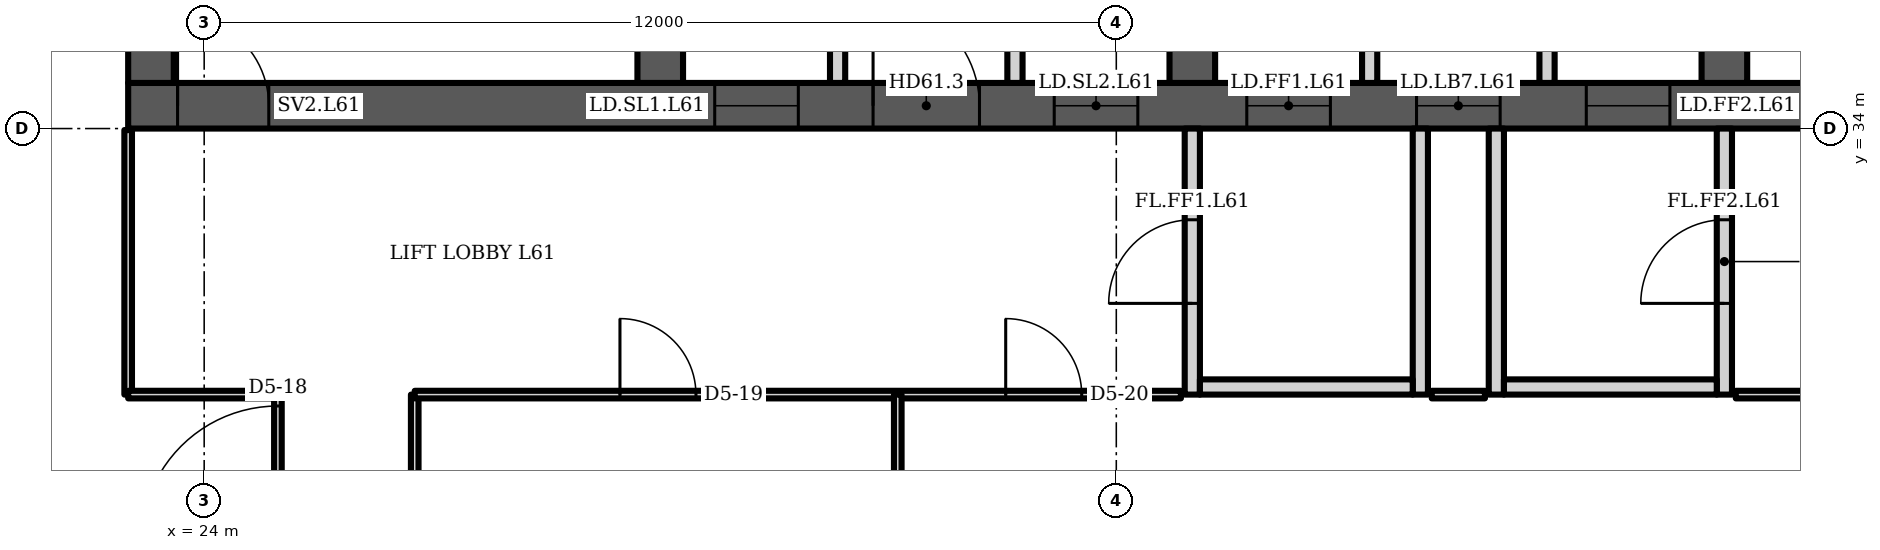
"""IFC4 building model, lengths in metres.
Left out: names, types, materials, properties, quantities, classifications, styles, units other than length and angle.
Written with IfcOpenShell. Run it as: python <this file> out.ifc"""

import sys

from ifc_helpers import new_model, si_unit, direction, frame, frame_2d, origin, place, context, subcontext, project, spatial, polyline, rectangle, outline, extrude, element, fill, save


model = new_model("IFC4")
c1 = context("Model", 3, precision=1e-05, world=origin(), true_north=direction((0.0, 1.0)))
c2 = subcontext(c1, "Body", "Model", "MODEL_VIEW")
j1 = project(units=[si_unit("LENGTHUNIT", "METRE"), si_unit("PLANEANGLEUNIT", "RADIAN")], contexts=[c1])
p1 = place(None, origin())
s1 = spatial("IfcSite", under=j1, at=p1, CompositionType="ELEMENT")
p2 = place(p1, origin())
s2 = spatial("IfcBuilding", under=s1, at=p2, CompositionType="ELEMENT")
p3 = place(p2, frame((0.0, 0.0, 243.1)))
s3 = spatial("IfcBuildingStorey", under=s2, at=p3, CompositionType="ELEMENT", Elevation=243.1)
p4 = place(p3, frame((23.0, 34.3, 0.0), z_axis=(0.0, 0.0, 1.0), x_axis=(1.0, 0.0, 0.0)))
e1 = element("IfcWall", 1, at=p4, inside=s3, PredefinedType="SHEAR", context=c2, shape_type="SweptSolid", body=[
    extrude(rectangle(XDim=35.0, YDim=0.6, at=frame_2d((17.5, 0.0))), origin(), (0.0, 0.0, 1.0), 3.6),
])
p5 = place(p4, frame((0.65, 0.0, 0.0)))
e2 = element("IfcOpeningElement", 2, at=p5, cuts=e1, PredefinedType="OPENING", context=c2, shape_type="SweptSolid", body=[
    extrude(rectangle(XDim=1.2, YDim=2.1, at=frame_2d((0.6, 1.05))), frame((0.0, 0.31, 0.0), z_axis=(0.0, -1.0, 0.0), x_axis=(1.0, 0.0, 0.0)), (0.0, 0.0, 1.0), 0.62),
])
p6 = place(p4, frame((7.717, 0.0, 0.0)))
e3 = element("IfcOpeningElement", 3, at=p6, cuts=e1, PredefinedType="OPENING", context=c2, shape_type="SweptSolid", body=[
    extrude(rectangle(XDim=1.1, YDim=2.1, at=frame_2d((0.55, 1.05))), frame((0.0, 0.31, 0.0), z_axis=(0.0, -1.0, 0.0), x_axis=(1.0, 0.0, 0.0)), (0.0, 0.0, 1.0), 0.62),
])
p7 = place(p4, frame((12.183, 0.0, 0.0)))
e4 = element("IfcOpeningElement", 4, at=p7, cuts=e1, PredefinedType="OPENING", context=c2, shape_type="SweptSolid", body=[
    extrude(rectangle(XDim=1.1, YDim=2.1, at=frame_2d((0.55, 1.05))), frame((0.0, 0.31, 0.0), z_axis=(0.0, -1.0, 0.0), x_axis=(1.0, 0.0, 0.0)), (0.0, 0.0, 1.0), 0.62),
])
p8 = place(p4, frame((9.8, 0.0, 0.0)))
e5 = element("IfcOpeningElement", 5, at=p8, cuts=e1, PredefinedType="OPENING", context=c2, shape_type="SweptSolid", body=[
    extrude(rectangle(XDim=1.4, YDim=2.1, at=frame_2d((0.7, 1.05))), frame((0.0, 0.31, 0.0), z_axis=(0.0, -1.0, 0.0), x_axis=(1.0, 0.0, 0.0)), (0.0, 0.0, 1.0), 0.62),
])
p9 = place(p4, frame((14.717, 0.0, 0.0)))
e6 = element("IfcOpeningElement", 6, at=p9, cuts=e1, PredefinedType="OPENING", context=c2, shape_type="SweptSolid", body=[
    extrude(rectangle(XDim=1.1, YDim=2.1, at=frame_2d((0.55, 1.05))), frame((0.0, 0.31, 0.0), z_axis=(0.0, -1.0, 0.0), x_axis=(1.0, 0.0, 0.0)), (0.0, 0.0, 1.0), 0.62),
])
p10 = place(p4, frame((16.95, 0.0, 0.0)))
e7 = element("IfcOpeningElement", 7, at=p10, cuts=e1, PredefinedType="OPENING", context=c2, shape_type="SweptSolid", body=[
    extrude(rectangle(XDim=1.1, YDim=2.1, at=frame_2d((0.55, 1.05))), frame((0.0, 0.31, 0.0), z_axis=(0.0, -1.0, 0.0), x_axis=(1.0, 0.0, 0.0)), (0.0, 0.0, 1.0), 0.62),
])
p11 = place(p4, frame((19.183, 0.0, 0.0)))
e8 = element("IfcOpeningElement", 8, at=p11, cuts=e1, PredefinedType="OPENING", context=c2, shape_type="SweptSolid", body=[
    extrude(rectangle(XDim=1.1, YDim=2.1, at=frame_2d((0.55, 1.05))), frame((0.0, 0.31, 0.0), z_axis=(0.0, -1.0, 0.0), x_axis=(1.0, 0.0, 0.0)), (0.0, 0.0, 1.0), 0.62),
])
p12 = place(p4, frame((26.15, 0.0, 0.0)))
e9 = element("IfcOpeningElement", 9, at=p12, cuts=e1, PredefinedType="OPENING", context=c2, shape_type="SweptSolid", body=[
    extrude(rectangle(XDim=1.2, YDim=2.1, at=frame_2d((0.6, 1.05))), frame((0.0, 0.31, 0.0), z_axis=(0.0, -1.0, 0.0), x_axis=(1.0, 0.0, 0.0)), (0.0, 0.0, 1.0), 0.62),
])
p13 = place(p4, frame((28.767, 0.0, 0.0)))
e10 = element("IfcOpeningElement", 10, at=p13, cuts=e1, PredefinedType="OPENING", context=c2, shape_type="SweptSolid", body=[
    extrude(rectangle(XDim=1.0, YDim=2.1, at=frame_2d((0.5, 1.05))), frame((0.0, 0.31, 0.0), z_axis=(0.0, -1.0, 0.0), x_axis=(1.0, 0.0, 0.0)), (0.0, 0.0, 1.0), 0.62),
])
p14 = place(p4, frame((33.083, 0.0, 0.0)))
e11 = element("IfcOpeningElement", 11, at=p14, cuts=e1, PredefinedType="OPENING", context=c2, shape_type="SweptSolid", body=[
    extrude(rectangle(XDim=1.0, YDim=2.1, at=frame_2d((0.5, 1.05))), frame((0.0, 0.31, 0.0), z_axis=(0.0, -1.0, 0.0), x_axis=(1.0, 0.0, 0.0)), (0.0, 0.0, 1.0), 0.62),
])
p15 = place(p4, frame((30.8, 0.0, 0.0)))
e12 = element("IfcOpeningElement", 12, at=p15, cuts=e1, PredefinedType="OPENING", context=c2, shape_type="SweptSolid", body=[
    extrude(rectangle(XDim=1.4, YDim=2.1, at=frame_2d((0.7, 1.05))), frame((0.0, 0.31, 0.0), z_axis=(0.0, -1.0, 0.0), x_axis=(1.0, 0.0, 0.0)), (0.0, 0.0, 1.0), 0.62),
])
p16 = place(p3, frame((23.3, 34.6, 0.0), z_axis=(0.0, 0.0, 1.0), x_axis=(0.0, 1.0, 0.0)))
e13 = element("IfcWall", 13, at=p16, inside=s3, PredefinedType="SHEAR", context=c2, shape_type="SweptSolid", body=[
    extrude(rectangle(XDim=13.585, YDim=0.6, at=frame_2d((6.792, 0.0))), origin(), (0.0, 0.0, 1.0), 3.6),
])
p17 = place(p3, frame((30.0, 34.6, 0.0), z_axis=(0.0, 0.0, 1.0), x_axis=(0.0, 1.0, 0.0)))
e14 = element("IfcWall", 14, at=p17, inside=s3, PredefinedType="SHEAR", context=c2, shape_type="SweptSolid", body=[
    extrude(rectangle(XDim=14.171, YDim=0.6, at=frame_2d((7.085, 0.0))), origin(), (0.0, 0.0, 1.0), 3.6),
])
p18 = place(p17, frame((3.8, 0.0, 0.0)))
e15 = element("IfcOpeningElement", 15, at=p18, cuts=e14, PredefinedType="OPENING", context=c2, shape_type="SweptSolid", body=[
    extrude(rectangle(XDim=1.1, YDim=2.1, at=frame_2d((0.55, 1.05))), frame((0.0, 0.31, 0.0), z_axis=(0.0, -1.0, 0.0), x_axis=(1.0, 0.0, 0.0)), (0.0, 0.0, 1.0), 0.62),
])
p19 = place(p3, frame((37.0, 34.6, 0.0), z_axis=(0.0, 0.0, 1.0), x_axis=(0.0, 1.0, 0.0)))
e16 = element("IfcWall", 16, at=p19, inside=s3, PredefinedType="SHEAR", context=c2, shape_type="SweptSolid", body=[
    extrude(rectangle(XDim=14.784, YDim=0.6, at=frame_2d((7.392, 0.0))), origin(), (0.0, 0.0, 1.0), 3.6),
])
p20 = place(p19, frame((11.302, 0.0, 0.0)))
e17 = element("IfcOpeningElement", 17, at=p20, cuts=e16, PredefinedType="OPENING", context=c2, shape_type="SweptSolid", body=[
    extrude(rectangle(XDim=1.0, YDim=2.1, at=frame_2d((0.5, 1.05))), frame((0.0, 0.31, 0.0), z_axis=(0.0, -1.0, 0.0), x_axis=(1.0, 0.0, 0.0)), (0.0, 0.0, 1.0), 0.62),
])
p21 = place(p19, frame((3.8, 0.0, 0.0)))
e18 = element("IfcOpeningElement", 18, at=p21, cuts=e16, PredefinedType="OPENING", context=c2, shape_type="SweptSolid", body=[
    extrude(rectangle(XDim=1.1, YDim=2.1, at=frame_2d((0.55, 1.05))), frame((0.0, 0.31, 0.0), z_axis=(0.0, -1.0, 0.0), x_axis=(1.0, 0.0, 0.0)), (0.0, 0.0, 1.0), 0.62),
])
p22 = place(p3, frame((44.0, 34.6, 0.0), z_axis=(0.0, 0.0, 1.0), x_axis=(0.0, 1.0, 0.0)))
e19 = element("IfcWall", 19, at=p22, inside=s3, PredefinedType="SHEAR", context=c2, shape_type="SweptSolid", body=[
    extrude(rectangle(XDim=14.784, YDim=0.6, at=frame_2d((7.392, 0.0))), origin(), (0.0, 0.0, 1.0), 3.6),
])
p23 = place(p22, frame((11.608, 0.0, 0.0)))
e20 = element("IfcOpeningElement", 20, at=p23, cuts=e19, PredefinedType="OPENING", context=c2, shape_type="SweptSolid", body=[
    extrude(rectangle(XDim=1.0, YDim=2.1, at=frame_2d((0.5, 1.05))), frame((0.0, 0.31, 0.0), z_axis=(0.0, -1.0, 0.0), x_axis=(1.0, 0.0, 0.0)), (0.0, 0.0, 1.0), 0.62),
])
p24 = place(p22, frame((3.8, 0.0, 0.0)))
e21 = element("IfcOpeningElement", 21, at=p24, cuts=e19, PredefinedType="OPENING", context=c2, shape_type="SweptSolid", body=[
    extrude(rectangle(XDim=1.1, YDim=2.1, at=frame_2d((0.55, 1.05))), frame((0.0, 0.31, 0.0), z_axis=(0.0, -1.0, 0.0), x_axis=(1.0, 0.0, 0.0)), (0.0, 0.0, 1.0), 0.62),
])
p25 = place(p3, frame((0.0, 0.0, -0.0)))
e22 = element("IfcWall", 22, at=p25, inside=s3, PredefinedType="PARTITIONING", context=c2, shape_type="SweptSolid", body=[
    extrude(outline(polyline([(32.233, 37.45), (30.3, 37.45), (30.3, 37.65), (32.233, 37.65), (32.433, 37.65), (32.433, 34.6), (32.233, 34.6), (32.233, 37.45)])), origin(), (0.0, 0.0, 1.0), 3.2),
])
p26 = place(p3, frame((0.0, 0.0, -0.0)))
e23 = element("IfcWall", 23, at=p26, inside=s3, PredefinedType="PARTITIONING", context=c2, shape_type="SweptSolid", body=[
    extrude(outline(polyline([(34.567, 37.65), (34.767, 37.65), (36.7, 37.65), (36.7, 37.45), (34.767, 37.45), (34.767, 34.6), (34.567, 34.6), (34.567, 37.65)])), origin(), (0.0, 0.0, 1.0), 3.2),
])
p27 = place(p3, frame((0.0, 0.0, -0.0)))
e24 = element("IfcWall", 24, at=p27, inside=s3, PredefinedType="PARTITIONING", context=c2, shape_type="SweptSolid", body=[
    extrude(outline(polyline([(41.567, 37.1), (39.433, 37.1), (39.433, 34.6), (39.233, 34.6), (39.233, 37.45), (37.3, 37.45), (37.3, 37.65), (39.233, 37.65), (39.433, 37.65), (39.433, 37.3), (41.567, 37.3), (41.567, 37.35), (41.767, 37.35), (43.7, 37.35), (43.7, 37.15), (41.767, 37.15), (41.767, 34.6), (41.567, 34.6), (41.567, 37.1)])), origin(), (0.0, 0.0, 1.0), 3.2),
])
p28 = place(p3, frame((37.0, 30.5, 0.0), z_axis=(0.0, 0.0, 1.0), x_axis=(0.0, 1.0, 0.0)))
e25 = element("IfcWall", 25, at=p28, inside=s3, PredefinedType="PARTITIONING", context=c2, shape_type="SweptSolid", body=[
    extrude(rectangle(XDim=3.5, YDim=0.2, at=frame_2d((1.75, 0.0))), origin(), (0.0, 0.0, 1.0), 3.2),
])
p29 = place(p28, frame((1.2, 0.0, 0.0)))
e26 = element("IfcOpeningElement", 26, at=p29, cuts=e25, PredefinedType="OPENING", context=c2, shape_type="SweptSolid", body=[
    extrude(rectangle(XDim=1.1, YDim=2.1, at=frame_2d((0.55, 1.05))), frame((0.0, 0.11, 0.0), z_axis=(0.0, -1.0, 0.0), x_axis=(1.0, 0.0, 0.0)), (0.0, 0.0, 1.0), 0.22),
])
p30 = place(p3, frame((40.0, 30.5, 0.0), z_axis=(0.0, 0.0, 1.0), x_axis=(0.0, 1.0, 0.0)))
e27 = element("IfcWall", 27, at=p30, inside=s3, PredefinedType="PARTITIONING", context=c2, shape_type="SweptSolid", body=[
    extrude(rectangle(XDim=3.5, YDim=0.2, at=frame_2d((1.75, 0.0))), origin(), (0.0, 0.0, 1.0), 3.2),
])
p31 = place(p3, frame((37.1, 30.6, 0.0), z_axis=(0.0, 0.0, 1.0), x_axis=(1.0, 0.0, 0.0)))
e28 = element("IfcWall", 28, at=p31, inside=s3, PredefinedType="PARTITIONING", context=c2, shape_type="SweptSolid", body=[
    extrude(rectangle(XDim=2.8, YDim=0.2, at=frame_2d((1.4, 0.0))), origin(), (0.0, 0.0, 1.0), 3.2),
])
p32 = place(p3, frame((41.0, 30.5, 0.0), z_axis=(0.0, 0.0, 1.0), x_axis=(0.0, 1.0, 0.0)))
e29 = element("IfcWall", 29, at=p32, inside=s3, PredefinedType="PARTITIONING", context=c2, shape_type="SweptSolid", body=[
    extrude(rectangle(XDim=3.5, YDim=0.2, at=frame_2d((1.75, 0.0))), origin(), (0.0, 0.0, 1.0), 3.2),
])
p33 = place(p3, frame((44.0, 30.5, 0.0), z_axis=(0.0, 0.0, 1.0), x_axis=(0.0, 1.0, 0.0)))
e30 = element("IfcWall", 30, at=p33, inside=s3, PredefinedType="PARTITIONING", context=c2, shape_type="SweptSolid", body=[
    extrude(rectangle(XDim=3.5, YDim=0.2, at=frame_2d((1.75, 0.0))), origin(), (0.0, 0.0, 1.0), 3.2),
])
p34 = place(p33, frame((1.2, 0.0, 0.0)))
e31 = element("IfcOpeningElement", 31, at=p34, cuts=e30, PredefinedType="OPENING", context=c2, shape_type="SweptSolid", body=[
    extrude(rectangle(XDim=1.1, YDim=2.1, at=frame_2d((0.55, 1.05))), frame((0.0, 0.11, 0.0), z_axis=(0.0, -1.0, 0.0), x_axis=(1.0, 0.0, 0.0)), (0.0, 0.0, 1.0), 0.22),
])
p35 = place(p3, frame((41.1, 30.6, 0.0), z_axis=(0.0, 0.0, 1.0), x_axis=(1.0, 0.0, 0.0)))
e32 = element("IfcWall", 32, at=p35, inside=s3, PredefinedType="PARTITIONING", context=c2, shape_type="SweptSolid", body=[
    extrude(rectangle(XDim=2.8, YDim=0.2, at=frame_2d((1.4, 0.0))), origin(), (0.0, 0.0, 1.0), 3.2),
])
p36 = place(p3, frame((23.0, 30.5, 0.0), z_axis=(0.0, 0.0, 1.0), x_axis=(0.0, 1.0, 0.0)))
e33 = element("IfcWall", 33, at=p36, inside=s3, PredefinedType="PARTITIONING", context=c2, shape_type="SweptSolid", body=[
    extrude(rectangle(XDim=3.48, YDim=0.1, at=frame_2d((1.74, 0.0))), origin(), (0.0, 0.0, 1.0), 3.2),
])
p37 = place(p3, frame((23.0, 30.5, 0.0), z_axis=(0.0, 0.0, 1.0), x_axis=(1.0, 0.0, 0.0)))
e34 = element("IfcWall", 34, at=p37, inside=s3, PredefinedType="PARTITIONING", context=c2, shape_type="SweptSolid", body=[
    extrude(rectangle(XDim=1.97, YDim=0.1, at=frame_2d((0.985, 0.0))), origin(), (0.0, 0.0, 1.0), 3.2),
])
p38 = place(p3, frame((24.97, 23.25, 0.0), z_axis=(0.0, 0.0, 1.0), x_axis=(0.0, 1.0, 0.0)))
e35 = element("IfcWall", 35, at=p38, inside=s3, PredefinedType="PARTITIONING", context=c2, shape_type="SweptSolid", body=[
    extrude(rectangle(XDim=7.25, YDim=0.1, at=frame_2d((3.625, 0.0))), origin(), (0.0, 0.0, 1.0), 3.2),
])
p39 = place(p38, frame((5.3, 0.0, 0.0)))
e36 = element("IfcOpeningElement", 36, at=p39, cuts=e35, PredefinedType="OPENING", context=c2, shape_type="SweptSolid", body=[
    extrude(rectangle(XDim=1.8, YDim=2.1, at=frame_2d((0.9, 1.05))), frame((0.0, 0.06, 0.0), z_axis=(0.0, -1.0, 0.0), x_axis=(1.0, 0.0, 0.0)), (0.0, 0.0, 1.0), 0.12),
])
p40 = place(p3, frame((26.77, 22.36, 0.0), z_axis=(0.0, 0.0, 1.0), x_axis=(0.0, 1.0, 0.0)))
e37 = element("IfcWall", 37, at=p40, inside=s3, PredefinedType="PARTITIONING", context=c2, shape_type="SweptSolid", body=[
    extrude(rectangle(XDim=8.14, YDim=0.1, at=frame_2d((4.07, 0.0))), origin(), (0.0, 0.0, 1.0), 3.2),
])
p41 = place(p3, frame((26.77, 30.5, 0.0), z_axis=(0.0, 0.0, 1.0), x_axis=(1.0, 0.0, 0.0)))
e38 = element("IfcWall", 38, at=p41, inside=s3, PredefinedType="PARTITIONING", context=c2, shape_type="SweptSolid", body=[
    extrude(rectangle(XDim=10.08, YDim=0.1, at=frame_2d((5.04, 0.0))), origin(), (0.0, 0.0, 1.0), 3.2),
])
p42 = place(p41, frame((2.7, 0.0, 0.0)))
e39 = element("IfcOpeningElement", 39, at=p42, cuts=e38, PredefinedType="OPENING", context=c2, shape_type="SweptSolid", body=[
    extrude(rectangle(XDim=1.0, YDim=2.1, at=frame_2d((0.5, 1.05))), frame((0.0, 0.06, 0.0), z_axis=(0.0, -1.0, 0.0), x_axis=(1.0, 0.0, 0.0)), (0.0, 0.0, 1.0), 0.12),
])
p43 = place(p41, frame((7.775, 0.0, 0.0)))
e40 = element("IfcOpeningElement", 40, at=p43, cuts=e38, PredefinedType="OPENING", context=c2, shape_type="SweptSolid", body=[
    extrude(rectangle(XDim=1.0, YDim=2.1, at=frame_2d((0.5, 1.05))), frame((0.0, 0.06, 0.0), z_axis=(0.0, -1.0, 0.0), x_axis=(1.0, 0.0, 0.0)), (0.0, 0.0, 1.0), 0.12),
])
p44 = place(p3, frame((33.125, 22.36, 0.0), z_axis=(0.0, 0.0, 1.0), x_axis=(0.0, 1.0, 0.0)))
e41 = element("IfcWall", 41, at=p44, inside=s3, PredefinedType="PARTITIONING", context=c2, shape_type="SweptSolid", body=[
    extrude(rectangle(XDim=8.14, YDim=0.1, at=frame_2d((4.07, 0.0))), origin(), (0.0, 0.0, 1.0), 3.2),
])
p45 = place(p3, frame((40.15, 30.5, 0.0), z_axis=(0.0, 0.0, 1.0), x_axis=(1.0, 0.0, 0.0)))
e42 = element("IfcWall", 42, at=p45, inside=s3, PredefinedType="PARTITIONING", context=c2, shape_type="SweptSolid", body=[
    extrude(rectangle(XDim=0.7, YDim=0.1, at=frame_2d((0.35, 0.0))), origin(), (0.0, 0.0, 1.0), 3.2),
])
p46 = place(p3, frame((44.15, 30.5, 0.0), z_axis=(0.0, 0.0, 1.0), x_axis=(1.0, 0.0, 0.0)))
e43 = element("IfcWall", 43, at=p46, inside=s3, PredefinedType="PARTITIONING", context=c2, shape_type="SweptSolid", body=[
    extrude(rectangle(XDim=13.85, YDim=0.1, at=frame_2d((6.925, 0.0))), origin(), (0.0, 0.0, 1.0), 3.2),
])
p47 = place(p46, frame((8.695, 0.0, 0.0)))
e44 = element("IfcOpeningElement", 44, at=p47, cuts=e43, PredefinedType="OPENING", context=c2, shape_type="SweptSolid", body=[
    extrude(rectangle(XDim=1.8, YDim=2.1, at=frame_2d((0.9, 1.05))), frame((0.0, 0.06, 0.0), z_axis=(0.0, -1.0, 0.0), x_axis=(1.0, 0.0, 0.0)), (0.0, 0.0, 1.0), 0.12),
])
p48 = place(p5, origin())
e45 = element("IfcDoor", 45, at=p48, inside=s3, OperationType="SINGLE_SWING_LEFT", PredefinedType="DOOR", context=c2, shape_type="SweptSolid", body=[
    extrude(rectangle(XDim=1.2, YDim=2.1, at=frame_2d((0.6, 1.05))), frame((0.0, 0.025, 0.0), z_axis=(0.0, -1.0, 0.0), x_axis=(1.0, 0.0, 0.0)), (0.0, 0.0, 1.0), 0.05),
])
fill(e2, e45)
p49 = place(p6, origin())
e46 = element("IfcDoor", 46, at=p49, inside=s3, OperationType="DOUBLE_DOOR_SLIDING", PredefinedType="DOOR", context=c2, shape_type="SweptSolid", body=[
    extrude(rectangle(XDim=1.1, YDim=2.1, at=frame_2d((0.55, 1.05))), frame((0.0, 0.025, 0.0), z_axis=(0.0, -1.0, 0.0), x_axis=(1.0, 0.0, 0.0)), (0.0, 0.0, 1.0), 0.05),
])
fill(e3, e46)
p50 = place(p7, origin())
e47 = element("IfcDoor", 47, at=p50, inside=s3, OperationType="DOUBLE_DOOR_SLIDING", PredefinedType="DOOR", context=c2, shape_type="SweptSolid", body=[
    extrude(rectangle(XDim=1.1, YDim=2.1, at=frame_2d((0.55, 1.05))), frame((0.0, 0.025, 0.0), z_axis=(0.0, -1.0, 0.0), x_axis=(1.0, 0.0, 0.0)), (0.0, 0.0, 1.0), 0.05),
])
fill(e4, e47)
p51 = place(p8, origin())
e48 = element("IfcDoor", 48, at=p51, inside=s3, OperationType="DOUBLE_DOOR_SINGLE_SWING", PredefinedType="DOOR", context=c2, shape_type="SweptSolid", body=[
    extrude(rectangle(XDim=1.4, YDim=2.1, at=frame_2d((0.7, 1.05))), frame((0.0, 0.025, 0.0), z_axis=(0.0, -1.0, 0.0), x_axis=(1.0, 0.0, 0.0)), (0.0, 0.0, 1.0), 0.05),
])
fill(e5, e48)
p52 = place(p9, origin())
e49 = element("IfcDoor", 49, at=p52, inside=s3, OperationType="DOUBLE_DOOR_SLIDING", PredefinedType="DOOR", context=c2, shape_type="SweptSolid", body=[
    extrude(rectangle(XDim=1.1, YDim=2.1, at=frame_2d((0.55, 1.05))), frame((0.0, 0.025, 0.0), z_axis=(0.0, -1.0, 0.0), x_axis=(1.0, 0.0, 0.0)), (0.0, 0.0, 1.0), 0.05),
])
fill(e6, e49)
p53 = place(p10, origin())
e50 = element("IfcDoor", 50, at=p53, inside=s3, OperationType="DOUBLE_DOOR_SLIDING", PredefinedType="DOOR", context=c2, shape_type="SweptSolid", body=[
    extrude(rectangle(XDim=1.1, YDim=2.1, at=frame_2d((0.55, 1.05))), frame((0.0, 0.025, 0.0), z_axis=(0.0, -1.0, 0.0), x_axis=(1.0, 0.0, 0.0)), (0.0, 0.0, 1.0), 0.05),
])
fill(e7, e50)
p54 = place(p11, origin())
e51 = element("IfcDoor", 51, at=p54, inside=s3, OperationType="DOUBLE_DOOR_SLIDING", PredefinedType="DOOR", context=c2, shape_type="SweptSolid", body=[
    extrude(rectangle(XDim=1.1, YDim=2.1, at=frame_2d((0.55, 1.05))), frame((0.0, 0.025, 0.0), z_axis=(0.0, -1.0, 0.0), x_axis=(1.0, 0.0, 0.0)), (0.0, 0.0, 1.0), 0.05),
])
fill(e8, e51)
p55 = place(p29, origin())
e52 = element("IfcDoor", 52, at=p55, inside=s3, OperationType="SINGLE_SWING_LEFT", PredefinedType="DOOR", context=c2, shape_type="SweptSolid", body=[
    extrude(rectangle(XDim=1.1, YDim=2.1, at=frame_2d((0.55, 1.05))), frame((0.0, 0.025, 0.0), z_axis=(0.0, -1.0, 0.0), x_axis=(1.0, 0.0, 0.0)), (0.0, 0.0, 1.0), 0.05),
])
fill(e26, e52)
p56 = place(p34, origin())
e53 = element("IfcDoor", 53, at=p56, inside=s3, OperationType="SINGLE_SWING_LEFT", PredefinedType="DOOR", context=c2, shape_type="SweptSolid", body=[
    extrude(rectangle(XDim=1.1, YDim=2.1, at=frame_2d((0.55, 1.05))), frame((0.0, 0.025, 0.0), z_axis=(0.0, -1.0, 0.0), x_axis=(1.0, 0.0, 0.0)), (0.0, 0.0, 1.0), 0.05),
])
fill(e31, e53)
p57 = place(p39, origin())
e54 = element("IfcDoor", 54, at=p57, inside=s3, OperationType="DOUBLE_DOOR_SINGLE_SWING", PredefinedType="DOOR", context=c2, shape_type="SweptSolid", body=[
    extrude(rectangle(XDim=1.8, YDim=2.1, at=frame_2d((0.9, 1.05))), frame((0.0, 0.025, 0.0), z_axis=(0.0, -1.0, 0.0), x_axis=(1.0, 0.0, 0.0)), (0.0, 0.0, 1.0), 0.05),
])
fill(e36, e54)
p58 = place(p42, origin())
e55 = element("IfcDoor", 55, at=p58, inside=s3, OperationType="SINGLE_SWING_LEFT", PredefinedType="DOOR", context=c2, shape_type="SweptSolid", body=[
    extrude(rectangle(XDim=1.0, YDim=2.1, at=frame_2d((0.5, 1.05))), frame((0.0, 0.025, 0.0), z_axis=(0.0, -1.0, 0.0), x_axis=(1.0, 0.0, 0.0)), (0.0, 0.0, 1.0), 0.05),
])
fill(e39, e55)
p59 = place(p43, origin())
e56 = element("IfcDoor", 56, at=p59, inside=s3, OperationType="SINGLE_SWING_LEFT", PredefinedType="DOOR", context=c2, shape_type="SweptSolid", body=[
    extrude(rectangle(XDim=1.0, YDim=2.1, at=frame_2d((0.5, 1.05))), frame((0.0, 0.025, 0.0), z_axis=(0.0, -1.0, 0.0), x_axis=(1.0, 0.0, 0.0)), (0.0, 0.0, 1.0), 0.05),
])
fill(e40, e56)
save(model, sys.argv[1])
